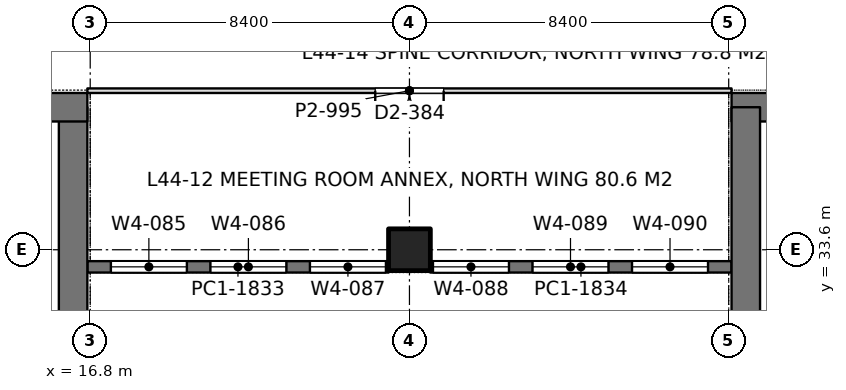
"""IFC4 building model, lengths in metres.
Left out: names, types, materials, properties, quantities, classifications, styles, units other than length and angle.
Written with IfcOpenShell. Run it as: python <this file> out.ifc"""

import sys

from ifc_helpers import new_model, si_unit, direction, frame, frame_2d, origin, origin_2d, place, context, subcontext, project, spatial, rectangle, extrude, element, fill, save


model = new_model("IFC4")
c1 = context("Model", 3, precision=1e-05, world=origin(), true_north=direction((0.0, 1.0)))
c2 = subcontext(c1, "Body", "Model", "MODEL_VIEW")
j1 = project(units=[si_unit("LENGTHUNIT", "METRE"), si_unit("PLANEANGLEUNIT", "RADIAN")], contexts=[c1])
p1 = place(None, origin())
s1 = spatial("IfcSite", under=j1, at=p1, CompositionType="ELEMENT")
p2 = place(p1, origin())
s2 = spatial("IfcBuilding", under=s1, at=p2, CompositionType="ELEMENT")
p3 = place(p2, frame((0.0, 0.0, 194.4)))
s3 = spatial("IfcBuildingStorey", under=s2, at=p3, CompositionType="ELEMENT", Elevation=194.4)
p4 = place(p3, frame((25.2, 33.6, 0.0), z_axis=(0.0, 0.0, 1.0), x_axis=(1.0, 0.0, 0.0)))
e1 = element("IfcColumn", 1, at=p4, inside=s3, PredefinedType="COLUMN", context=c2, shape_type="SweptSolid", body=[
    extrude(rectangle(XDim=1.1, YDim=1.1, at=origin_2d()), origin(), (0.0, 0.0, 1.0), 4.2),
])
p5 = place(p3, frame((-1.125, 37.35, 0.0), z_axis=(0.0, 0.0, 1.0), x_axis=(1.0, 0.0, 0.0)))
e2 = element("IfcWall", 2, at=p5, inside=s3, PredefinedType="SHEAR", context=c2, shape_type="SweptSolid", body=[
    extrude(rectangle(XDim=17.85, YDim=0.75, at=frame_2d((8.925, 0.0))), origin(), (0.0, 0.0, 1.0), 4.2),
])
p6 = place(p5, frame((8.875, 0.0, 0.0)))
e3 = element("IfcOpeningElement", 3, at=p6, cuts=e2, PredefinedType="OPENING", context=c2, shape_type="SweptSolid", body=[
    extrude(rectangle(XDim=1.8, YDim=2.4, at=frame_2d((0.9, 1.2))), frame((0.0, 0.385, 0.0), z_axis=(0.0, -1.0, 0.0), x_axis=(1.0, 0.0, 0.0)), (0.0, 0.0, 1.0), 0.77),
])
p7 = place(p3, frame((16.35, 27.8, 0.0), z_axis=(0.0, 0.0, 1.0), x_axis=(0.0, 1.0, 0.0)))
e4 = element("IfcWall", 4, at=p7, inside=s3, PredefinedType="SHEAR", context=c2, shape_type="SweptSolid", body=[
    extrude(rectangle(XDim=9.55, YDim=0.75, at=frame_2d((4.775, 0.0))), origin(), (0.0, 0.0, 1.0), 4.2),
])
p8 = place(p3, frame((33.675, 37.35, 0.0), z_axis=(0.0, 0.0, 1.0), x_axis=(1.0, 0.0, 0.0)))
e5 = element("IfcWall", 5, at=p8, inside=s3, PredefinedType="SHEAR", context=c2, shape_type="SweptSolid", body=[
    extrude(rectangle(XDim=17.85, YDim=0.75, at=frame_2d((8.925, 0.0))), origin(), (0.0, 0.0, 1.0), 4.2),
])
p9 = place(p8, frame((7.175, 0.0, 0.0)))
e6 = element("IfcOpeningElement", 6, at=p9, cuts=e5, PredefinedType="OPENING", context=c2, shape_type="SweptSolid", body=[
    extrude(rectangle(XDim=1.8, YDim=2.4, at=frame_2d((0.9, 1.2))), frame((0.0, 0.385, 0.0), z_axis=(0.0, -1.0, 0.0), x_axis=(1.0, 0.0, 0.0)), (0.0, 0.0, 1.0), 0.77),
])
p10 = place(p3, frame((34.05, 27.8, 0.0), z_axis=(0.0, 0.0, 1.0), x_axis=(0.0, 1.0, 0.0)))
e7 = element("IfcWall", 7, at=p10, inside=s3, PredefinedType="SHEAR", context=c2, shape_type="SweptSolid", body=[
    extrude(rectangle(XDim=9.55, YDim=0.75, at=frame_2d((4.775, 0.0))), origin(), (0.0, 0.0, 1.0), 4.2),
])
p11 = place(p3, frame((16.725, 33.15, 0.0), z_axis=(0.0, 0.0, 1.0), x_axis=(1.0, 0.0, 0.0)))
e8 = element("IfcWall", 8, at=p11, inside=s3, PredefinedType="SOLIDWALL", context=c2, shape_type="SweptSolid", body=[
    extrude(rectangle(XDim=7.925, YDim=0.3, at=frame_2d((3.962, 0.0))), origin(), (0.0, 0.0, 1.0), 4.05),
])
p12 = place(p11, frame((0.619, 0.0, 0.9)))
e9 = element("IfcOpeningElement", 9, at=p12, cuts=e8, PredefinedType="OPENING", context=c2, shape_type="SweptSolid", body=[
    extrude(rectangle(XDim=2.0, YDim=1.9, at=frame_2d((1.0, 0.95))), frame((0.0, 0.16, 0.0), z_axis=(0.0, -1.0, 0.0), x_axis=(1.0, 0.0, 0.0)), (0.0, 0.0, 1.0), 0.32),
])
p13 = place(p11, frame((3.238, 0.0, 0.9)))
e10 = element("IfcOpeningElement", 10, at=p13, cuts=e8, PredefinedType="OPENING", context=c2, shape_type="SweptSolid", body=[
    extrude(rectangle(XDim=2.0, YDim=1.9, at=frame_2d((1.0, 0.95))), frame((0.0, 0.16, 0.0), z_axis=(0.0, -1.0, 0.0), x_axis=(1.0, 0.0, 0.0)), (0.0, 0.0, 1.0), 0.32),
])
p14 = place(p11, frame((5.856, 0.0, 0.9)))
e11 = element("IfcOpeningElement", 11, at=p14, cuts=e8, PredefinedType="OPENING", context=c2, shape_type="SweptSolid", body=[
    extrude(rectangle(XDim=2.0, YDim=1.9, at=frame_2d((1.0, 0.95))), frame((0.0, 0.16, 0.0), z_axis=(0.0, -1.0, 0.0), x_axis=(1.0, 0.0, 0.0)), (0.0, 0.0, 1.0), 0.32),
])
p15 = place(p3, frame((25.75, 33.15, 0.0), z_axis=(0.0, 0.0, 1.0), x_axis=(1.0, 0.0, 0.0)))
e12 = element("IfcWall", 12, at=p15, inside=s3, PredefinedType="SOLIDWALL", context=c2, shape_type="SweptSolid", body=[
    extrude(rectangle(XDim=7.925, YDim=0.3, at=frame_2d((3.962, 0.0))), origin(), (0.0, 0.0, 1.0), 4.05),
])
p16 = place(p15, frame((0.069, 0.0, 0.9)))
e13 = element("IfcOpeningElement", 13, at=p16, cuts=e12, PredefinedType="OPENING", context=c2, shape_type="SweptSolid", body=[
    extrude(rectangle(XDim=2.0, YDim=1.9, at=frame_2d((1.0, 0.95))), frame((0.0, 0.16, 0.0), z_axis=(0.0, -1.0, 0.0), x_axis=(1.0, 0.0, 0.0)), (0.0, 0.0, 1.0), 0.32),
])
p17 = place(p15, frame((2.688, 0.0, 0.9)))
e14 = element("IfcOpeningElement", 14, at=p17, cuts=e12, PredefinedType="OPENING", context=c2, shape_type="SweptSolid", body=[
    extrude(rectangle(XDim=2.0, YDim=1.9, at=frame_2d((1.0, 0.95))), frame((0.0, 0.16, 0.0), z_axis=(0.0, -1.0, 0.0), x_axis=(1.0, 0.0, 0.0)), (0.0, 0.0, 1.0), 0.32),
])
p18 = place(p15, frame((5.306, 0.0, 0.9)))
e15 = element("IfcOpeningElement", 15, at=p18, cuts=e12, PredefinedType="OPENING", context=c2, shape_type="SweptSolid", body=[
    extrude(rectangle(XDim=2.0, YDim=1.9, at=frame_2d((1.0, 0.95))), frame((0.0, 0.16, 0.0), z_axis=(0.0, -1.0, 0.0), x_axis=(1.0, 0.0, 0.0)), (0.0, 0.0, 1.0), 0.32),
])
p19 = place(p3, frame((16.725, 37.785, 0.0), z_axis=(0.0, 0.0, 1.0), x_axis=(1.0, 0.0, 0.0)))
e16 = element("IfcWall", 16, at=p19, inside=s3, PredefinedType="PARTITIONING", context=c2, shape_type="SweptSolid", body=[
    extrude(rectangle(XDim=16.95, YDim=0.12, at=frame_2d((8.475, 0.0))), origin(), (0.0, 0.0, 1.0), 3.55),
])
p20 = place(p19, frame((7.575, 0.0, 0.0)))
e17 = element("IfcOpeningElement", 17, at=p20, cuts=e16, PredefinedType="OPENING", context=c2, shape_type="SweptSolid", body=[
    extrude(rectangle(XDim=1.8, YDim=2.2, at=frame_2d((0.9, 1.1))), frame((0.0, 0.07, 0.0), z_axis=(0.0, -1.0, 0.0), x_axis=(1.0, 0.0, 0.0)), (0.0, 0.0, 1.0), 0.14),
])
p21 = place(p12, origin())
e18 = element("IfcWindow", 18, at=p21, inside=s3, PartitioningType="SINGLE_PANEL", PredefinedType="WINDOW", context=c2, shape_type="SweptSolid", body=[
    extrude(rectangle(XDim=2.0, YDim=1.9, at=frame_2d((1.0, 0.95))), frame((0.0, 0.03, 0.0), z_axis=(0.0, -1.0, 0.0), x_axis=(1.0, 0.0, 0.0)), (0.0, 0.0, 1.0), 0.06),
])
fill(e9, e18)
p22 = place(p13, origin())
e19 = element("IfcWindow", 19, at=p22, inside=s3, PartitioningType="SINGLE_PANEL", PredefinedType="WINDOW", context=c2, shape_type="SweptSolid", body=[
    extrude(rectangle(XDim=2.0, YDim=1.9, at=frame_2d((1.0, 0.95))), frame((0.0, 0.03, 0.0), z_axis=(0.0, -1.0, 0.0), x_axis=(1.0, 0.0, 0.0)), (0.0, 0.0, 1.0), 0.06),
])
fill(e10, e19)
p23 = place(p14, origin())
e20 = element("IfcWindow", 20, at=p23, inside=s3, PartitioningType="SINGLE_PANEL", PredefinedType="WINDOW", context=c2, shape_type="SweptSolid", body=[
    extrude(rectangle(XDim=2.0, YDim=1.9, at=frame_2d((1.0, 0.95))), frame((0.0, 0.03, 0.0), z_axis=(0.0, -1.0, 0.0), x_axis=(1.0, 0.0, 0.0)), (0.0, 0.0, 1.0), 0.06),
])
fill(e11, e20)
p24 = place(p16, origin())
e21 = element("IfcWindow", 21, at=p24, inside=s3, PartitioningType="SINGLE_PANEL", PredefinedType="WINDOW", context=c2, shape_type="SweptSolid", body=[
    extrude(rectangle(XDim=2.0, YDim=1.9, at=frame_2d((1.0, 0.95))), frame((0.0, 0.03, 0.0), z_axis=(0.0, -1.0, 0.0), x_axis=(1.0, 0.0, 0.0)), (0.0, 0.0, 1.0), 0.06),
])
fill(e13, e21)
p25 = place(p17, origin())
e22 = element("IfcWindow", 22, at=p25, inside=s3, PartitioningType="SINGLE_PANEL", PredefinedType="WINDOW", context=c2, shape_type="SweptSolid", body=[
    extrude(rectangle(XDim=2.0, YDim=1.9, at=frame_2d((1.0, 0.95))), frame((0.0, 0.03, 0.0), z_axis=(0.0, -1.0, 0.0), x_axis=(1.0, 0.0, 0.0)), (0.0, 0.0, 1.0), 0.06),
])
fill(e14, e22)
p26 = place(p18, origin())
e23 = element("IfcWindow", 23, at=p26, inside=s3, PartitioningType="SINGLE_PANEL", PredefinedType="WINDOW", context=c2, shape_type="SweptSolid", body=[
    extrude(rectangle(XDim=2.0, YDim=1.9, at=frame_2d((1.0, 0.95))), frame((0.0, 0.03, 0.0), z_axis=(0.0, -1.0, 0.0), x_axis=(1.0, 0.0, 0.0)), (0.0, 0.0, 1.0), 0.06),
])
fill(e15, e23)
p27 = place(p20, frame((1.8, 0.0, 0.0), z_axis=(0.0, 0.0, 1.0), x_axis=(-1.0, 0.0, 0.0)))
e24 = element("IfcDoor", 24, at=p27, inside=s3, OperationType="DOUBLE_DOOR_SINGLE_SWING", PredefinedType="DOOR", context=c2, shape_type="SweptSolid", body=[
    extrude(rectangle(XDim=1.8, YDim=2.2, at=frame_2d((0.9, 1.1))), frame((0.0, 0.025, 0.0), z_axis=(0.0, -1.0, 0.0), x_axis=(1.0, 0.0, 0.0)), (0.0, 0.0, 1.0), 0.05),
])
fill(e17, e24)
save(model, sys.argv[1])
